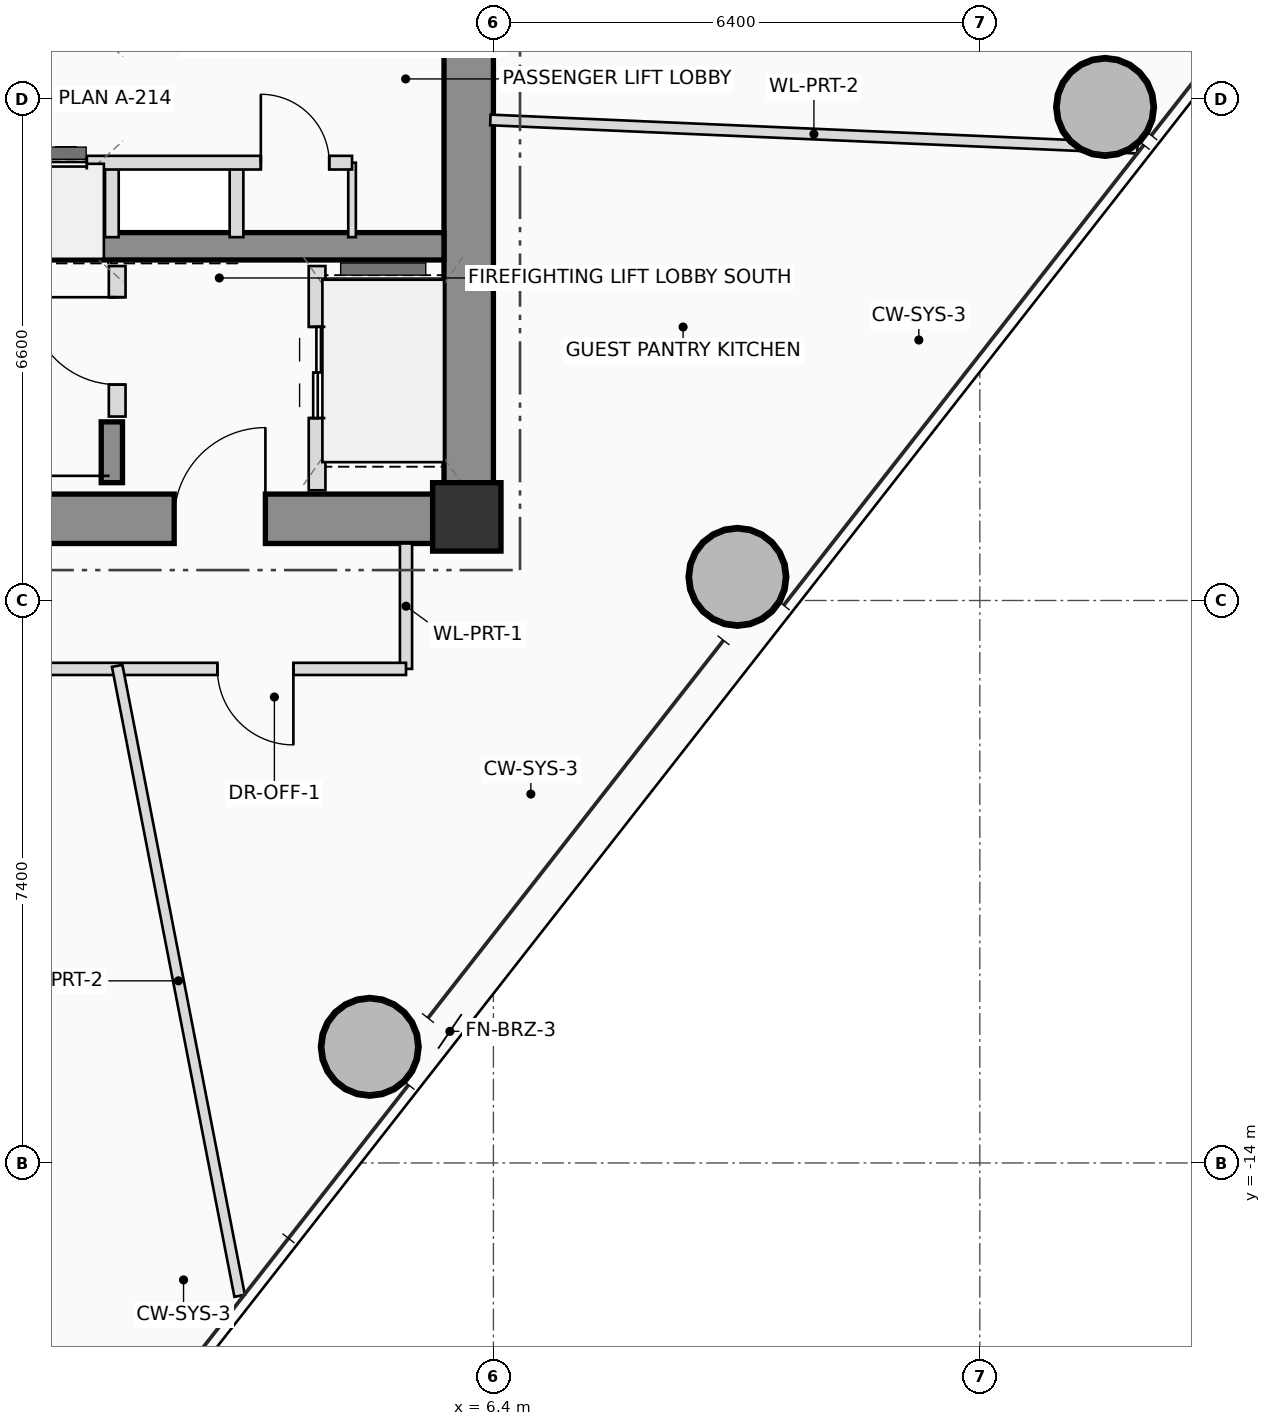
"""IFC4 building model, lengths in metres.
Left out: names, types, materials, properties, quantities, classifications, styles, units other than length and angle.
Written with IfcOpenShell. Run it as: python <this file> out.ifc"""

import sys

from ifc_helpers import new_model, si_unit, direction, frame, frame_2d, origin, origin_2d, place, context, subcontext, project, spatial, rectangle, hollow_circle, extrude, source, transform, mapped, element, fill, save


model = new_model("IFC4")
c1 = context("Model", 3, precision=1e-05, world=origin(), true_north=direction((0.0, 1.0)))
c2 = subcontext(c1, "Body", "Model", "MODEL_VIEW")
j1 = project(units=[si_unit("LENGTHUNIT", "METRE"), si_unit("PLANEANGLEUNIT", "RADIAN")], contexts=[c1])
p1 = place(None, origin())
s1 = spatial("IfcSite", under=j1, at=p1, CompositionType="ELEMENT")
p2 = place(p1, origin())
s2 = spatial("IfcBuilding", under=s1, at=p2, CompositionType="ELEMENT")
p3 = place(p2, frame((0.0, 0.0, 150.2)))
s3 = spatial("IfcBuildingStorey", under=s2, at=p3, CompositionType="ELEMENT", Elevation=150.2)
m1 = source(origin(), c2, "Body", "SweptSolid", [
    extrude(rectangle(XDim=0.9, YDim=0.9, at=origin_2d()), origin(), (0.0, 0.0, 1.0), 3.45),
])
p4 = place(p3, frame((6.05, -5.5, 0.0), z_axis=(0.0, 0.0, 1.0), x_axis=(1.0, 0.0, 0.0)))
e1 = element("IfcColumn", 1, at=p4, inside=s3, PredefinedType="COLUMN", context=c2, shape_type="MappedRepresentation", body=[
    mapped(m1, transform((0.0, 0.0, 0.0), scale=1.0)),
])
p5 = place(p3, frame((-6.4, -5.525, 0.0), z_axis=(0.0, 0.0, 1.0), x_axis=(1.0, 0.0, 0.0)))
e2 = element("IfcWall", 2, at=p5, inside=s3, PredefinedType="SHEAR", context=c2, shape_type="SweptSolid", body=[
    extrude(rectangle(XDim=12.8, YDim=0.65, at=frame_2d((6.4, 0.0))), origin(), (0.0, 0.0, 1.0), 3.45),
])
p6 = place(p5, frame((8.6, 0.0, 0.0)))
e3 = element("IfcOpeningElement", 3, at=p6, cuts=e2, PredefinedType="OPENING", context=c2, shape_type="SweptSolid", body=[
    extrude(rectangle(XDim=1.2, YDim=2.2, at=frame_2d((0.6, 1.1))), frame((0.0, 0.335, 0.0), z_axis=(0.0, -1.0, 0.0), x_axis=(1.0, 0.0, 0.0)), (0.0, 0.0, 1.0), 0.67),
])
p7 = place(p3, frame((6.075, -5.2, 0.0), z_axis=(0.0, 0.0, 1.0), x_axis=(0.0, 1.0, 0.0)))
e4 = element("IfcWall", 4, at=p7, inside=s3, PredefinedType="SHEAR", context=c2, shape_type="SweptSolid", body=[
    extrude(rectangle(XDim=10.4, YDim=0.65, at=frame_2d((5.2, 0.0))), origin(), (0.0, 0.0, 1.0), 3.45),
])
p8 = place(p3, frame((-5.75, -1.94, 0.0), z_axis=(0.0, 0.0, 1.0), x_axis=(1.0, 0.0, 0.0)))
e5 = element("IfcWall", 5, at=p8, inside=s3, PredefinedType="SHEAR", context=c2, shape_type="SweptSolid", body=[
    extrude(rectangle(XDim=11.5, YDim=0.36, at=frame_2d((5.75, 0.0))), origin(), (0.0, 0.0, 1.0), 3.45),
])
p9 = place(p3, frame((1.38, -5.05, 0.0), z_axis=(0.0, 0.0, 1.0), x_axis=(0.0, 1.0, 0.0)))
e6 = element("IfcWall", 6, at=p9, inside=s3, PredefinedType="SHEAR", context=c2, shape_type="SweptSolid", body=[
    extrude(rectangle(XDim=0.8, YDim=0.28, at=frame_2d((0.4, 0.0))), origin(), (0.0, 0.0, 1.0), 3.45),
])
m2 = source(origin(), c2, "Body", "SweptSolid", [
    extrude(hollow_circle(Radius=0.65, WallThickness=0.045, at=origin_2d()), origin(), (0.0, 0.0, 1.0), 3.45),
])
for number, where, z_axis, x_axis in (
    (7, (4.773, -12.472, 0.0), (0.0, 0.0, 1.0), (1.0, 0.0, 0.0)),
    (8, (9.611, -6.289, 0.0), (0.0, 0.0, 1.0), (1.0, 0.0, 0.0)),
    (9, (14.448, -0.107, 0.0), (0.0, 0.0, 1.0), (1.0, 0.0, 0.0)),
):
    element("IfcColumn", number, at=place(p3, frame(where, z_axis=z_axis, x_axis=x_axis)), inside=s3, PredefinedType="COLUMN", context=c2, shape_type="MappedRepresentation", body=[
        mapped(m2, transform((0.0, 0.0, 0.0), scale=1.0)),
    ])
p10 = place(p3, frame((1.45, -4.18, 0.0), z_axis=(0.0, 0.0, 1.0), x_axis=(0.0, 1.0, 0.0)))
e10 = element("IfcWall", 10, at=p10, inside=s3, PredefinedType="PLUMBINGWALL", context=c2, shape_type="SweptSolid", body=[
    extrude(rectangle(XDim=1.98, YDim=0.22, at=frame_2d((0.99, 0.0))), origin(), (0.0, 0.0, 1.0), 3.21),
])
p11 = place(p10, frame((0.42, 0.0, 0.0)))
e11 = element("IfcOpeningElement", 11, at=p11, cuts=e10, PredefinedType="OPENING", context=c2, shape_type="SweptSolid", body=[
    extrude(rectangle(XDim=1.15, YDim=2.15, at=frame_2d((0.575, 1.075))), frame((0.0, 0.12, 0.0), z_axis=(0.0, -1.0, 0.0), x_axis=(1.0, 0.0, 0.0)), (0.0, 0.0, 1.0), 0.24),
])
p12 = place(p3, frame((4.08, -5.15, 0.0), z_axis=(0.0, 0.0, 1.0), x_axis=(0.0, 1.0, 0.0)))
e12 = element("IfcWall", 12, at=p12, inside=s3, PredefinedType="PLUMBINGWALL", context=c2, shape_type="SweptSolid", body=[
    extrude(rectangle(XDim=2.95, YDim=0.22, at=frame_2d((1.475, 0.0))), origin(), (0.0, 0.0, 1.0), 3.21),
])
p13 = place(p12, frame((0.95, 0.0, 0.0)))
e13 = element("IfcOpeningElement", 13, at=p13, cuts=e12, PredefinedType="OPENING", context=c2, shape_type="SweptSolid", body=[
    extrude(rectangle(XDim=1.2, YDim=2.25, at=frame_2d((0.6, 1.125))), frame((0.0, 0.12, 0.0), z_axis=(0.0, -1.0, 0.0), x_axis=(1.0, 0.0, 0.0)), (0.0, 0.0, 1.0), 0.24),
])
for number, where, z_axis, x_axis in (
    (14, (1.38, -1.82, 0.0), (0.0, 0.0, 1.0), (0.0, 1.0, 0.0)),
    (15, (3.02, -1.82, 0.0), (0.0, 0.0, 1.0), (0.0, 1.0, 0.0)),
):
    element("IfcWall", number, at=place(p3, frame(where, z_axis=z_axis, x_axis=x_axis)), inside=s3, PredefinedType="PLUMBINGWALL", context=c2, shape_type="SweptSolid", body=[
        extrude(rectangle(XDim=0.98, YDim=0.18, at=frame_2d((0.49, 0.0))), origin(), (0.0, 0.0, 1.0), 3.21),
    ])
p14 = place(p3, frame((4.54, -1.82, 0.0), z_axis=(0.0, 0.0, 1.0), x_axis=(0.0, 1.0, 0.0)))
e16 = element("IfcWall", 16, at=p14, inside=s3, PredefinedType="PARTITIONING", context=c2, shape_type="SweptSolid", body=[
    extrude(rectangle(XDim=0.98, YDim=0.1, at=frame_2d((0.49, 0.0))), origin(), (0.0, 0.0, 1.0), 3.21),
])
p15 = place(p3, frame((-5.68, -0.84, 0.0), z_axis=(0.0, 0.0, 1.0), x_axis=(1.0, 0.0, 0.0)))
e17 = element("IfcWall", 17, at=p15, inside=s3, PredefinedType="PLUMBINGWALL", context=c2, shape_type="SweptSolid", body=[
    extrude(rectangle(XDim=10.22, YDim=0.18, at=frame_2d((5.11, 0.0))), origin(), (0.0, 0.0, 1.0), 3.21),
])
p16 = place(p15, frame((1.38, 0.0, 0.0)))
e18 = element("IfcOpeningElement", 18, at=p16, cuts=e17, PredefinedType="OPENING", context=c2, shape_type="SweptSolid", body=[
    extrude(rectangle(XDim=0.9, YDim=2.05, at=frame_2d((0.45, 1.025))), frame((0.0, 0.1, 0.0), z_axis=(0.0, -1.0, 0.0), x_axis=(1.0, 0.0, 0.0)), (0.0, 0.0, 1.0), 0.2),
])
p17 = place(p15, frame((3.93, 0.0, 0.0)))
e19 = element("IfcOpeningElement", 19, at=p17, cuts=e17, PredefinedType="OPENING", context=c2, shape_type="SweptSolid", body=[
    extrude(rectangle(XDim=1.1, YDim=2.2, at=frame_2d((0.55, 1.1))), frame((0.0, 0.1, 0.0), z_axis=(0.0, -1.0, 0.0), x_axis=(1.0, 0.0, 0.0)), (0.0, 0.0, 1.0), 0.2),
])
p18 = place(p15, frame((5.63, 0.0, 0.0)))
e20 = element("IfcOpeningElement", 20, at=p18, cuts=e17, PredefinedType="OPENING", context=c2, shape_type="SweptSolid", body=[
    extrude(rectangle(XDim=1.1, YDim=2.2, at=frame_2d((0.55, 1.1))), frame((0.0, 0.1, 0.0), z_axis=(0.0, -1.0, 0.0), x_axis=(1.0, 0.0, 0.0)), (0.0, 0.0, 1.0), 0.2),
])
p19 = place(p15, frame((9.02, 0.0, 0.0)))
e21 = element("IfcOpeningElement", 21, at=p19, cuts=e17, PredefinedType="OPENING", context=c2, shape_type="SweptSolid", body=[
    extrude(rectangle(XDim=0.9, YDim=2.05, at=frame_2d((0.45, 1.025))), frame((0.0, 0.1, 0.0), z_axis=(0.0, -1.0, 0.0), x_axis=(1.0, 0.0, 0.0)), (0.0, 0.0, 1.0), 0.2),
])
p20 = place(p3, frame((5.25, -5.85, 0.0), z_axis=(0.0, 0.0, 1.0), x_axis=(0.0, -1.0, 0.0)))
e22 = element("IfcWall", 22, at=p20, inside=s3, PredefinedType="PARTITIONING", context=c2, shape_type="SweptSolid", body=[
    extrude(rectangle(XDim=1.65, YDim=0.16, at=frame_2d((0.825, 0.0))), origin(), (0.0, 0.0, 1.0), 3.21),
])
p21 = place(p3, frame((5.25, -7.5, 0.0), z_axis=(0.0, 0.0, 1.0), x_axis=(-1.0, 0.0, 0.0)))
e23 = element("IfcWall", 23, at=p21, inside=s3, PredefinedType="PARTITIONING", context=c2, shape_type="SweptSolid", body=[
    extrude(rectangle(XDim=11.61, YDim=0.16, at=frame_2d((5.805, 0.0))), origin(), (0.0, 0.0, 1.0), 2.565),
])
p22 = place(p21, frame((1.482, 0.0, 0.0)))
e24 = element("IfcOpeningElement", 24, at=p22, cuts=e23, PredefinedType="OPENING", context=c2, shape_type="SweptSolid", body=[
    extrude(rectangle(XDim=1.0, YDim=2.25, at=frame_2d((0.5, 1.125))), frame((0.0, 0.09, 0.0), z_axis=(0.0, -1.0, 0.0), x_axis=(1.0, 0.0, 0.0)), (0.0, 0.0, 1.0), 0.18),
])
p23 = place(p3, frame((6.36, -0.278, 0.0), z_axis=(0.0, 0.0, 1.0), x_axis=(0.999047707238, -0.043631166178, 0.0)))
e25 = element("IfcWall", 25, at=p23, inside=s3, PredefinedType="PARTITIONING", context=c2, shape_type="SweptSolid", body=[
    extrude(rectangle(XDim=8.522, YDim=0.14, at=frame_2d((4.261, 0.0))), origin(), (0.0, 0.0, 1.0), 2.565),
])
p24 = place(p3, frame((1.45, -7.46, 0.0), z_axis=(0.0, 0.0, 1.0), x_axis=(0.190791487028, -0.981630586564, 0.0)))
e26 = element("IfcWall", 26, at=p24, inside=s3, PredefinedType="PARTITIONING", context=c2, shape_type="SweptSolid", body=[
    extrude(rectangle(XDim=8.443, YDim=0.14, at=frame_2d((4.221, 0.0))), origin(), (0.0, 0.0, 1.0), 2.725),
])
p25 = place(p6, origin())
e27 = element("IfcDoor", 27, at=p25, inside=s3, OperationType="SINGLE_SWING_RIGHT", PredefinedType="DOOR", context=c2, shape_type="SweptSolid", body=[
    extrude(rectangle(XDim=1.2, YDim=2.2, at=frame_2d((0.6, 1.1))), frame((0.0, 0.025, 0.0), z_axis=(0.0, -1.0, 0.0), x_axis=(1.0, 0.0, 0.0)), (0.0, 0.0, 1.0), 0.05),
])
fill(e3, e27)
p26 = place(p11, origin())
e28 = element("IfcDoor", 28, at=p26, inside=s3, OperationType="SINGLE_SWING_RIGHT", PredefinedType="DOOR", context=c2, shape_type="SweptSolid", body=[
    extrude(rectangle(XDim=1.15, YDim=2.15, at=frame_2d((0.575, 1.075))), frame((0.0, 0.025, 0.0), z_axis=(0.0, -1.0, 0.0), x_axis=(1.0, 0.0, 0.0)), (0.0, 0.0, 1.0), 0.05),
])
fill(e11, e28)
p27 = place(p13, origin())
e29 = element("IfcDoor", 29, at=p27, inside=s3, OperationType="DOUBLE_DOOR_SLIDING", PredefinedType="DOOR", context=c2, shape_type="SweptSolid", body=[
    extrude(rectangle(XDim=1.2, YDim=2.25, at=frame_2d((0.6, 1.125))), frame((0.0, 0.025, 0.0), z_axis=(0.0, -1.0, 0.0), x_axis=(1.0, 0.0, 0.0)), (0.0, 0.0, 1.0), 0.05),
])
fill(e13, e29)
p28 = place(p18, origin())
e30 = element("IfcDoor", 30, at=p28, inside=s3, OperationType="DOUBLE_DOOR_SLIDING", PredefinedType="DOOR", context=c2, shape_type="SweptSolid", body=[
    extrude(rectangle(XDim=1.1, YDim=2.2, at=frame_2d((0.55, 1.1))), frame((0.0, 0.025, 0.0), z_axis=(0.0, -1.0, 0.0), x_axis=(1.0, 0.0, 0.0)), (0.0, 0.0, 1.0), 0.05),
])
fill(e20, e30)
p29 = place(p19, origin())
e31 = element("IfcDoor", 31, at=p29, inside=s3, OperationType="SINGLE_SWING_LEFT", PredefinedType="DOOR", context=c2, shape_type="SweptSolid", body=[
    extrude(rectangle(XDim=0.9, YDim=2.05, at=frame_2d((0.45, 1.025))), frame((0.0, 0.025, 0.0), z_axis=(0.0, -1.0, 0.0), x_axis=(1.0, 0.0, 0.0)), (0.0, 0.0, 1.0), 0.05),
])
fill(e21, e31)
p30 = place(p22, origin())
e32 = element("IfcDoor", 32, at=p30, inside=s3, OperationType="SINGLE_SWING_LEFT", PredefinedType="DOOR", context=c2, shape_type="SweptSolid", body=[
    extrude(rectangle(XDim=1.0, YDim=2.25, at=frame_2d((0.5, 1.125))), frame((0.0, 0.025, 0.0), z_axis=(0.0, -1.0, 0.0), x_axis=(1.0, 0.0, 0.0)), (0.0, 0.0, 1.0), 0.05),
])
fill(e24, e32)
save(model, sys.argv[1])
